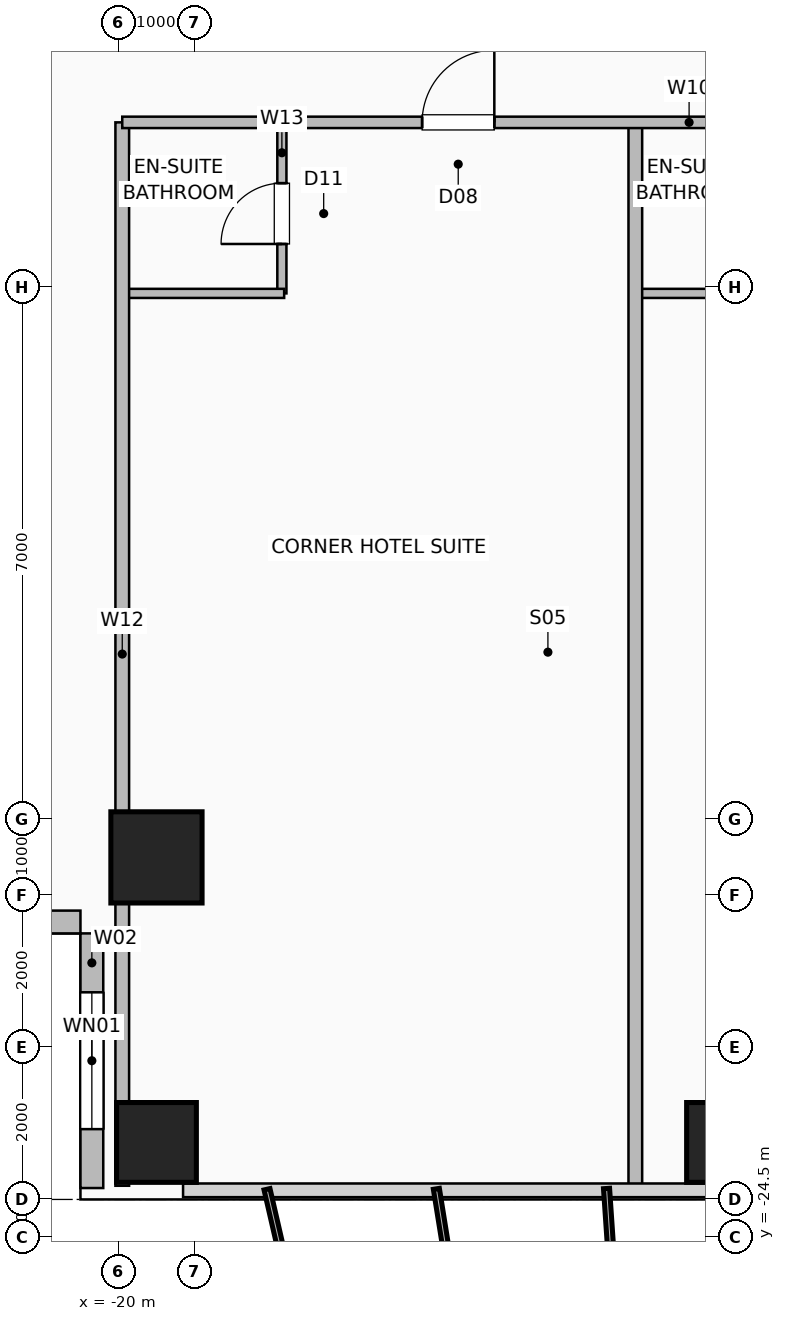
"""IFC4 building model, lengths in metres.
Left out: names, types, materials, properties, quantities, classifications, styles, units other than length and angle.
Written with IfcOpenShell. Run it as: python <this file> out.ifc"""

import sys

from ifc_helpers import new_model, si_unit, direction, frame, frame_2d, origin, origin_2d, place, context, subcontext, project, spatial, rectangle, hollow_rectangle, extrude, element, fill, save


model = new_model("IFC4")
c1 = context("Model", 3, precision=1e-05, world=origin(), true_north=direction((0.0, 1.0)))
c2 = subcontext(c1, "Body", "Model", "MODEL_VIEW")
j1 = project(units=[si_unit("LENGTHUNIT", "METRE"), si_unit("PLANEANGLEUNIT", "RADIAN")], contexts=[c1])
p1 = place(None, origin())
s1 = spatial("IfcSite", under=j1, at=p1, CompositionType="ELEMENT")
p2 = place(p1, origin())
s2 = spatial("IfcBuilding", under=s1, at=p2, CompositionType="ELEMENT")
p3 = place(p2, frame((0.0, 0.0, 79.5)))
s3 = spatial("IfcBuildingStorey", under=s2, at=p3, CompositionType="ELEMENT", Elevation=79.5)
for number, where, z_axis, x_axis in (
    (1, (-19.5, -23.25, 0.0), (0.0, 0.0, 1.0), (1.0, 0.0, 0.0)),
    (2, (-12.0, -23.25, 0.0), (0.0, 0.0, 1.0), (1.0, 0.0, 0.0)),
):
    element("IfcColumn", number, at=place(p3, frame(where, z_axis=z_axis, x_axis=x_axis)), inside=s3, PredefinedType="COLUMN", context=c2, shape_type="SweptSolid", body=[
        extrude(hollow_rectangle(XDim=1.05, YDim=1.05, WallThickness=0.05, at=origin_2d()), origin(), (0.0, 0.0, 1.0), 3.5),
    ])
p4 = place(p3, frame((-19.5, -19.5, 0.0), z_axis=(0.0, 0.0, 1.0), x_axis=(1.0, 0.0, 0.0)))
e3 = element("IfcColumn", 3, at=p4, inside=s3, PredefinedType="COLUMN", context=c2, shape_type="SweptSolid", body=[
    extrude(hollow_rectangle(XDim=1.2, YDim=1.2, WallThickness=0.055, at=origin_2d()), origin(), (0.0, 0.0, 1.0), 3.5),
])
p5 = place(p3, frame((-20.35, -23.85, 0.0), z_axis=(0.0, 0.0, 1.0), x_axis=(0.0, 1.0, 0.0)))
e4 = element("IfcWall", 4, at=p5, inside=s3, PredefinedType="SOLIDWALL", context=c2, shape_type="SweptSolid", body=[
    extrude(rectangle(XDim=3.35, YDim=0.3, at=frame_2d((1.675, 0.0))), origin(), (0.0, 0.0, 1.0), 3.15),
])
p6 = place(p5, frame((0.775, 0.0, 0.9)))
e5 = element("IfcOpeningElement", 5, at=p6, cuts=e4, PredefinedType="OPENING", context=c2, shape_type="SweptSolid", body=[
    extrude(rectangle(XDim=1.8, YDim=1.8, at=frame_2d((0.9, 0.9))), frame((0.0, 0.16, 0.0), z_axis=(0.0, -1.0, 0.0), x_axis=(1.0, 0.0, 0.0)), (0.0, 0.0, 1.0), 0.32),
])
p7 = place(p3, frame((-23.85, -20.35, 0.0), z_axis=(0.0, 0.0, 1.0), x_axis=(1.0, 0.0, 0.0)))
e6 = element("IfcWall", 6, at=p7, inside=s3, PredefinedType="SOLIDWALL", context=c2, shape_type="SweptSolid", body=[
    extrude(rectangle(XDim=3.35, YDim=0.3, at=frame_2d((1.675, 0.0))), origin(), (0.0, 0.0, 1.0), 3.15),
])
p8 = place(p3, frame((-17.85, -12.08, 0.0), z_axis=(0.0, 0.0, 1.0), x_axis=(0.0, 1.0, 0.0)))
e7 = element("IfcWall", 7, at=p8, inside=s3, PredefinedType="PLUMBINGWALL", context=c2, shape_type="SweptSolid", body=[
    extrude(rectangle(XDim=2.25, YDim=0.12, at=frame_2d((1.125, 0.0))), origin(), (0.0, 0.0, 1.0), 3.15),
])
p9 = place(p8, frame((0.65, 0.0, 0.0)))
e8 = element("IfcOpeningElement", 8, at=p9, cuts=e7, PredefinedType="OPENING", context=c2, shape_type="SweptSolid", body=[
    extrude(rectangle(XDim=0.8, YDim=2.05, at=frame_2d((0.4, 1.025))), frame((0.0, 0.07, 0.0), z_axis=(0.0, -1.0, 0.0), x_axis=(1.0, 0.0, 0.0)), (0.0, 0.0, 1.0), 0.14),
])
for number, where, z_axis, x_axis in (
    (9, (-19.92, -12.08, 0.0), (0.0, 0.0, 1.0), (1.0, 0.0, 0.0)),
    (10, (-13.17, -12.08, 0.0), (0.0, 0.0, 1.0), (1.0, 0.0, 0.0)),
):
    element("IfcWall", number, at=place(p3, frame(where, z_axis=z_axis, x_axis=x_axis)), inside=s3, PredefinedType="PLUMBINGWALL", context=c2, shape_type="SweptSolid", body=[
        extrude(rectangle(XDim=2.1, YDim=0.12, at=frame_2d((1.05, 0.0))), origin(), (0.0, 0.0, 1.0), 3.15),
    ])
for number, where, z_axis, x_axis in (
    (11, (-19.95, -23.82, 0.0), (0.0, 0.0, 1.0), (0.0, 1.0, 0.0)),
    (12, (-13.2, -23.82, 0.0), (0.0, 0.0, 1.0), (0.0, 1.0, 0.0)),
):
    element("IfcWall", number, at=place(p3, frame(where, z_axis=z_axis, x_axis=x_axis)), inside=s3, PredefinedType="PARTITIONING", context=c2, shape_type="SweptSolid", body=[
        extrude(rectangle(XDim=13.99, YDim=0.18, at=frame_2d((6.995, 0.0))), origin(), (0.0, 0.0, 1.0), 3.15),
    ])
p10 = place(p3, frame((-19.95, -9.83, 0.0), z_axis=(0.0, 0.0, 1.0), x_axis=(1.0, 0.0, 0.0)))
e13 = element("IfcWall", 13, at=p10, inside=s3, PredefinedType="PARTITIONING", context=c2, shape_type="SweptSolid", body=[
    extrude(rectangle(XDim=39.9, YDim=0.15, at=frame_2d((19.95, 0.0))), origin(), (0.0, 0.0, 1.0), 3.15),
])
p11 = place(p10, frame((3.945, 0.0, 0.0)))
e14 = element("IfcOpeningElement", 14, at=p11, cuts=e13, PredefinedType="OPENING", context=c2, shape_type="SweptSolid", body=[
    extrude(rectangle(XDim=0.95, YDim=2.08, at=frame_2d((0.475, 1.04))), frame((0.0, 0.085, 0.0), z_axis=(0.0, -1.0, 0.0), x_axis=(1.0, 0.0, 0.0)), (0.0, 0.0, 1.0), 0.17),
])
p12 = place(p10, frame((10.02, 0.0, 0.0)))
e15 = element("IfcOpeningElement", 15, at=p12, cuts=e13, PredefinedType="OPENING", context=c2, shape_type="SweptSolid", body=[
    extrude(rectangle(XDim=0.95, YDim=2.08, at=frame_2d((0.475, 1.04))), frame((0.0, 0.085, 0.0), z_axis=(0.0, -1.0, 0.0), x_axis=(1.0, 0.0, 0.0)), (0.0, 0.0, 1.0), 0.17),
])
p13 = place(p10, frame((15.42, 0.0, 0.0)))
e16 = element("IfcOpeningElement", 16, at=p13, cuts=e13, PredefinedType="OPENING", context=c2, shape_type="SweptSolid", body=[
    extrude(rectangle(XDim=0.95, YDim=2.08, at=frame_2d((0.475, 1.04))), frame((0.0, 0.085, 0.0), z_axis=(0.0, -1.0, 0.0), x_axis=(1.0, 0.0, 0.0)), (0.0, 0.0, 1.0), 0.17),
])
p14 = place(p10, frame((20.702, 0.0, 0.0)))
e17 = element("IfcOpeningElement", 17, at=p14, cuts=e13, PredefinedType="OPENING", context=c2, shape_type="SweptSolid", body=[
    extrude(rectangle(XDim=0.95, YDim=2.08, at=frame_2d((0.475, 1.04))), frame((0.0, 0.085, 0.0), z_axis=(0.0, -1.0, 0.0), x_axis=(1.0, 0.0, 0.0)), (0.0, 0.0, 1.0), 0.17),
])
p15 = place(p10, frame((26.02, 0.0, 0.0)))
e18 = element("IfcOpeningElement", 18, at=p15, cuts=e13, PredefinedType="OPENING", context=c2, shape_type="SweptSolid", body=[
    extrude(rectangle(XDim=0.95, YDim=2.08, at=frame_2d((0.475, 1.04))), frame((0.0, 0.085, 0.0), z_axis=(0.0, -1.0, 0.0), x_axis=(1.0, 0.0, 0.0)), (0.0, 0.0, 1.0), 0.17),
])
p16 = place(p10, frame((31.37, 0.0, 0.0)))
e19 = element("IfcOpeningElement", 19, at=p16, cuts=e13, PredefinedType="OPENING", context=c2, shape_type="SweptSolid", body=[
    extrude(rectangle(XDim=0.95, YDim=2.08, at=frame_2d((0.475, 1.04))), frame((0.0, 0.085, 0.0), z_axis=(0.0, -1.0, 0.0), x_axis=(1.0, 0.0, 0.0)), (0.0, 0.0, 1.0), 0.17),
])
p17 = place(p10, frame((37.245, 0.0, 0.0)))
e20 = element("IfcOpeningElement", 20, at=p17, cuts=e13, PredefinedType="OPENING", context=c2, shape_type="SweptSolid", body=[
    extrude(rectangle(XDim=0.95, YDim=2.08, at=frame_2d((0.475, 1.04))), frame((0.0, 0.085, 0.0), z_axis=(0.0, -1.0, 0.0), x_axis=(1.0, 0.0, 0.0)), (0.0, 0.0, 1.0), 0.17),
])
p18 = place(p6, origin())
e21 = element("IfcWindow", 21, at=p18, inside=s3, PartitioningType="SINGLE_PANEL", PredefinedType="WINDOW", context=c2, shape_type="SweptSolid", body=[
    extrude(rectangle(XDim=1.8, YDim=1.8, at=frame_2d((0.9, 0.9))), frame((0.0, 0.03, 0.0), z_axis=(0.0, -1.0, 0.0), x_axis=(1.0, 0.0, 0.0)), (0.0, 0.0, 1.0), 0.06),
])
fill(e5, e21)
p19 = place(p9, origin())
e22 = element("IfcDoor", 22, at=p19, inside=s3, OperationType="SINGLE_SWING_LEFT", PredefinedType="DOOR", context=c2, shape_type="SweptSolid", body=[
    extrude(rectangle(XDim=0.8, YDim=2.05, at=frame_2d((0.4, 1.025))), frame((0.0, 0.025, 0.0), z_axis=(0.0, -1.0, 0.0), x_axis=(1.0, 0.0, 0.0)), (0.0, 0.0, 1.0), 0.05),
])
fill(e8, e22)
p20 = place(p11, origin())
e23 = element("IfcDoor", 23, at=p20, inside=s3, OperationType="SINGLE_SWING_RIGHT", PredefinedType="DOOR", context=c2, shape_type="SweptSolid", body=[
    extrude(rectangle(XDim=0.95, YDim=2.08, at=frame_2d((0.475, 1.04))), frame((0.0, 0.025, 0.0), z_axis=(0.0, -1.0, 0.0), x_axis=(1.0, 0.0, 0.0)), (0.0, 0.0, 1.0), 0.05),
])
fill(e14, e23)
save(model, sys.argv[1])
